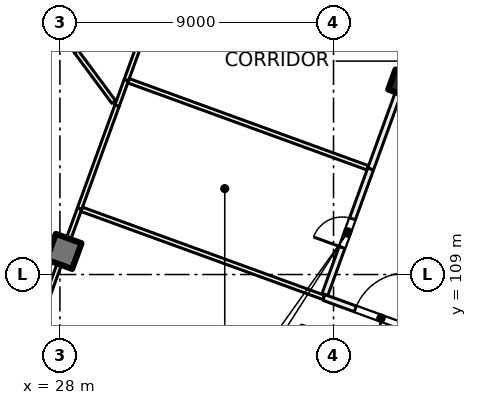
"""IFC4 building model, lengths in metres.
Left out: names, types, materials, properties, quantities, classifications, styles, units other than length and angle.
Written with IfcOpenShell. Run it as: python <this file> out.ifc"""

import sys

from ifc_helpers import new_model, si_unit, direction, frame, frame_2d, origin, origin_2d, place, context, subcontext, project, spatial, rectangle, extrude, element, fill, save


model = new_model("IFC4")
c1 = context("Model", 3, precision=1e-05, world=origin(), true_north=direction((0.0, 1.0)))
c2 = subcontext(c1, "Body", "Model", "MODEL_VIEW")
j1 = project(units=[si_unit("LENGTHUNIT", "METRE"), si_unit("PLANEANGLEUNIT", "RADIAN")], contexts=[c1])
p1 = place(None, origin())
s1 = spatial("IfcSite", under=j1, at=p1, CompositionType="ELEMENT")
p2 = place(p1, origin())
s2 = spatial("IfcBuilding", under=s1, at=p2, CompositionType="ELEMENT")
p3 = place(p2, origin())
s3 = spatial("IfcBuildingStorey", under=s2, at=p3, CompositionType="ELEMENT", Elevation=0.0)
p4 = place(p3, frame((39.247, 115.293, 0.0), z_axis=(0.0, 0.0, 1.0), x_axis=(-0.342020143326, -0.939692620786, 0.0)))
e1 = element("IfcColumn", 1, at=p4, inside=s3, PredefinedType="COLUMN", context=c2, shape_type="SweptSolid", body=[
    extrude(rectangle(XDim=0.7, YDim=0.7, at=origin_2d()), origin(), (0.0, 0.0, 1.0), 7.5),
])
p5 = place(p3, frame((28.134, 109.76, 0.0), z_axis=(0.0, 0.0, 1.0), x_axis=(-0.342020143326, -0.939692620786, 0.0)))
e2 = element("IfcColumn", 2, at=p5, inside=s3, PredefinedType="COLUMN", context=c2, shape_type="SweptSolid", body=[
    extrude(rectangle(XDim=0.9, YDim=0.9, at=origin_2d()), origin(), (0.0, 0.0, 1.0), 7.5),
])
p6 = place(p3, frame((12.199, 89.809, 0.0), z_axis=(0.0, 0.0, 1.0), x_axis=(0.342022998908, 0.939691581434, 0.0)))
e3 = element("IfcWall", 3, at=p6, inside=s3, PredefinedType="SOLIDWALL", context=c2, shape_type="SweptSolid", body=[
    extrude(rectangle(XDim=47.334, YDim=0.6, at=frame_2d((23.667, 0.0))), origin(), (0.0, 0.0, 1.0), 7.1),
])
p7 = place(p6, frame((1.523, 0.0, 0.0)))
e4 = element("IfcOpeningElement", 4, at=p7, cuts=e3, PredefinedType="OPENING", context=c2, shape_type="SweptSolid", body=[
    extrude(rectangle(XDim=1.2, YDim=2.4, at=frame_2d((0.6, 1.2))), frame((0.0, 0.31, 0.0), z_axis=(0.0, -1.0, 0.0), x_axis=(1.0, 0.0, 0.0)), (0.0, 0.0, 1.0), 0.62),
])
p8 = place(p6, frame((5.829, 0.0, 0.0)))
e5 = element("IfcOpeningElement", 5, at=p8, cuts=e3, PredefinedType="OPENING", context=c2, shape_type="SweptSolid", body=[
    extrude(rectangle(XDim=1.2, YDim=2.4, at=frame_2d((0.6, 1.2))), frame((0.0, 0.31, 0.0), z_axis=(0.0, -1.0, 0.0), x_axis=(1.0, 0.0, 0.0)), (0.0, 0.0, 1.0), 0.62),
])
p9 = place(p6, frame((9.235, 0.0, 0.9)))
e6 = element("IfcOpeningElement", 6, at=p9, cuts=e3, PredefinedType="OPENING", context=c2, shape_type="SweptSolid", body=[
    extrude(rectangle(XDim=3.0, YDim=4.2, at=frame_2d((1.5, 2.1))), frame((0.0, 0.31, 0.0), z_axis=(0.0, -1.0, 0.0), x_axis=(1.0, 0.0, 0.0)), (0.0, 0.0, 1.0), 0.62),
])
p10 = place(p6, frame((13.99, 0.0, 0.9)))
e7 = element("IfcOpeningElement", 7, at=p10, cuts=e3, PredefinedType="OPENING", context=c2, shape_type="SweptSolid", body=[
    extrude(rectangle(XDim=3.0, YDim=4.2, at=frame_2d((1.5, 2.1))), frame((0.0, 0.31, 0.0), z_axis=(0.0, -1.0, 0.0), x_axis=(1.0, 0.0, 0.0)), (0.0, 0.0, 1.0), 0.62),
])
p11 = place(p6, frame((17.846, 0.0, 0.9)))
e8 = element("IfcOpeningElement", 8, at=p11, cuts=e3, PredefinedType="OPENING", context=c2, shape_type="SweptSolid", body=[
    extrude(rectangle(XDim=3.0, YDim=4.2, at=frame_2d((1.5, 2.1))), frame((0.0, 0.31, 0.0), z_axis=(0.0, -1.0, 0.0), x_axis=(1.0, 0.0, 0.0)), (0.0, 0.0, 1.0), 0.62),
])
p12 = place(p6, frame((22.452, 0.0, 0.9)))
e9 = element("IfcOpeningElement", 9, at=p12, cuts=e3, PredefinedType="OPENING", context=c2, shape_type="SweptSolid", body=[
    extrude(rectangle(XDim=3.0, YDim=4.2, at=frame_2d((1.5, 2.1))), frame((0.0, 0.31, 0.0), z_axis=(0.0, -1.0, 0.0), x_axis=(1.0, 0.0, 0.0)), (0.0, 0.0, 1.0), 0.62),
])
p13 = place(p6, frame((26.458, 0.0, 0.9)))
e10 = element("IfcOpeningElement", 10, at=p13, cuts=e3, PredefinedType="OPENING", context=c2, shape_type="SweptSolid", body=[
    extrude(rectangle(XDim=3.0, YDim=4.2, at=frame_2d((1.5, 2.1))), frame((0.0, 0.31, 0.0), z_axis=(0.0, -1.0, 0.0), x_axis=(1.0, 0.0, 0.0)), (0.0, 0.0, 1.0), 0.62),
])
p14 = place(p6, frame((31.064, 0.0, 0.9)))
e11 = element("IfcOpeningElement", 11, at=p14, cuts=e3, PredefinedType="OPENING", context=c2, shape_type="SweptSolid", body=[
    extrude(rectangle(XDim=3.0, YDim=4.2, at=frame_2d((1.5, 2.1))), frame((0.0, 0.31, 0.0), z_axis=(0.0, -1.0, 0.0), x_axis=(1.0, 0.0, 0.0)), (0.0, 0.0, 1.0), 0.62),
])
p15 = place(p6, frame((36.029, 0.0, 0.9)))
e12 = element("IfcOpeningElement", 12, at=p15, cuts=e3, PredefinedType="OPENING", context=c2, shape_type="SweptSolid", body=[
    extrude(rectangle(XDim=1.2, YDim=4.2, at=frame_2d((0.6, 2.1))), frame((0.0, 0.31, 0.0), z_axis=(0.0, -1.0, 0.0), x_axis=(1.0, 0.0, 0.0)), (0.0, 0.0, 1.0), 0.62),
])
p16 = place(p6, frame((39.676, 0.0, 0.9)))
e13 = element("IfcOpeningElement", 13, at=p16, cuts=e3, PredefinedType="OPENING", context=c2, shape_type="SweptSolid", body=[
    extrude(rectangle(XDim=3.0, YDim=4.2, at=frame_2d((1.5, 2.1))), frame((0.0, 0.31, 0.0), z_axis=(0.0, -1.0, 0.0), x_axis=(1.0, 0.0, 0.0)), (0.0, 0.0, 1.0), 0.62),
])
p17 = place(p6, frame((43.531, 0.0, 0.9)))
e14 = element("IfcOpeningElement", 14, at=p17, cuts=e3, PredefinedType="OPENING", context=c2, shape_type="SweptSolid", body=[
    extrude(rectangle(XDim=3.0, YDim=4.2, at=frame_2d((1.5, 2.1))), frame((0.0, 0.31, 0.0), z_axis=(0.0, -1.0, 0.0), x_axis=(1.0, 0.0, 0.0)), (0.0, 0.0, 1.0), 0.62),
])
p18 = place(p3, frame((24.8, 100.598, 0.0), z_axis=(0.0, 0.0, 1.0), x_axis=(0.341943433621, 0.93972053729, 0.0)))
e15 = element("IfcWall", 15, at=p18, inside=s3, PredefinedType="PARTITIONING", context=c2, shape_type="SweptSolid", body=[
    extrude(rectangle(XDim=11.25, YDim=0.15, at=frame_2d((5.625, 0.0))), origin(), (0.0, 0.0, 1.0), 7.1),
])
p19 = place(p3, frame((27.478, 118.104, 0.0), z_axis=(0.0, 0.0, 1.0), x_axis=(0.514009565734, -0.857784452141, 0.0)))
e16 = element("IfcWall", 16, at=p19, inside=s3, PredefinedType="PARTITIONING", context=c2, shape_type="SweptSolid", body=[
    extrude(rectangle(XDim=2.068, YDim=0.15, at=frame_2d((1.034, 0.0))), origin(), (0.0, 0.0, 1.0), 7.1),
])
p20 = place(p3, frame((28.537, 116.336, 0.0), z_axis=(0.0, 0.0, 1.0), x_axis=(0.595741297031, -0.80317638599, 0.0)))
e17 = element("IfcWall", 17, at=p20, inside=s3, PredefinedType="PARTITIONING", context=c2, shape_type="SweptSolid", body=[
    extrude(rectangle(XDim=2.068, YDim=0.15, at=frame_2d((1.034, 0.0))), origin(), (0.0, 0.0, 1.0), 7.1),
])
p21 = place(p3, frame((28.647, 111.17, 0.0), z_axis=(0.0, 0.0, 1.0), x_axis=(0.341993373756, 0.939702363681, 0.0)))
e18 = element("IfcWall", 18, at=p21, inside=s3, PredefinedType="PARTITIONING", context=c2, shape_type="SweptSolid", body=[
    extrude(rectangle(XDim=3.602, YDim=0.15, at=frame_2d((1.801, 0.0))), origin(), (0.0, 0.0, 1.0), 7.1),
])
p22 = place(p3, frame((28.717, 111.144, 0.0), z_axis=(0.0, 0.0, 1.0), x_axis=(0.939731172492, -0.341914204803, 0.0)))
e19 = element("IfcWall", 19, at=p22, inside=s3, PredefinedType="PARTITIONING", context=c2, shape_type="SweptSolid", body=[
    extrude(rectangle(XDim=8.476, YDim=0.15, at=frame_2d((4.238, 0.0))), origin(), (0.0, 0.0, 1.0), 7.1),
])
p23 = place(p3, frame((29.879, 114.555, 0.0), z_axis=(0.0, 0.0, 1.0), x_axis=(0.341961311006, 0.939714031914, 0.0)))
e20 = element("IfcWall", 20, at=p23, inside=s3, PredefinedType="PARTITIONING", context=c2, shape_type="SweptSolid", body=[
    extrude(rectangle(XDim=0.898, YDim=0.15, at=frame_2d((0.449, 0.0))), origin(), (0.0, 0.0, 1.0), 7.1),
])
p24 = place(p3, frame((30.186, 115.399, 0.0), z_axis=(0.0, 0.0, 1.0), x_axis=(0.342121388632, 0.939655764331, 0.0)))
e21 = element("IfcWall", 21, at=p24, inside=s3, PredefinedType="PARTITIONING", context=c2, shape_type="SweptSolid", body=[
    extrude(rectangle(XDim=13.574, YDim=0.15, at=frame_2d((6.787, 0.0))), origin(), (0.0, 0.0, 1.0), 7.1),
])
p25 = place(p3, frame((30.256, 115.373, 0.0), z_axis=(0.0, 0.0, 1.0), x_axis=(0.939683593483, -0.342044944618, 0.0)))
e22 = element("IfcWall", 22, at=p25, inside=s3, PredefinedType="PARTITIONING", context=c2, shape_type="SweptSolid", body=[
    extrude(rectangle(XDim=8.376, YDim=0.15, at=frame_2d((4.188, 0.0))), origin(), (0.0, 0.0, 1.0), 7.1),
])
p26 = place(p3, frame((36.716, 108.34, 0.0), z_axis=(0.0, 0.0, 1.0), x_axis=(0.342063854115, 0.939676710208, 0.0)))
e23 = element("IfcWall", 23, at=p26, inside=s3, PredefinedType="PARTITIONING", context=c2, shape_type="SweptSolid", body=[
    extrude(rectangle(XDim=4.399, YDim=0.2, at=frame_2d((2.2, 0.0))), origin(), (0.0, 0.0, 1.0), 7.1),
])
p27 = place(p26, frame((1.652, 0.0, 0.0)))
e24 = element("IfcOpeningElement", 24, at=p27, cuts=e23, PredefinedType="OPENING", context=c2, shape_type="SweptSolid", body=[
    extrude(rectangle(XDim=1.0, YDim=2.1, at=frame_2d((0.5, 1.05))), frame((0.0, 0.11, 0.0), z_axis=(0.0, -1.0, 0.0), x_axis=(1.0, 0.0, 0.0)), (0.0, 0.0, 1.0), 0.22),
])
p28 = place(p3, frame((40.44, 106.878, 0.0), z_axis=(0.0, 0.0, 1.0), x_axis=(-0.939665029144, 0.342095941228, 0.0)))
e25 = element("IfcWall", 25, at=p28, inside=s3, PredefinedType="PARTITIONING", context=c2, shape_type="SweptSolid", body=[
    extrude(rectangle(XDim=3.999, YDim=0.2, at=frame_2d((2.0, 0.0))), origin(), (0.0, 0.0, 1.0), 7.1),
])
p29 = place(p28, frame((1.099, 0.0, 0.0)))
e26 = element("IfcOpeningElement", 26, at=p29, cuts=e25, PredefinedType="OPENING", context=c2, shape_type="SweptSolid", body=[
    extrude(rectangle(XDim=1.8, YDim=2.1, at=frame_2d((0.9, 1.05))), frame((0.0, 0.11, 0.0), z_axis=(0.0, -1.0, 0.0), x_axis=(1.0, 0.0, 0.0)), (0.0, 0.0, 1.0), 0.22),
])
p30 = place(p3, frame((38.221, 112.474, 0.0), z_axis=(0.0, 0.0, 1.0), x_axis=(0.342018071111, 0.939693375008, 0.0)))
e27 = element("IfcWall", 27, at=p30, inside=s3, PredefinedType="PARTITIONING", context=c2, shape_type="SweptSolid", body=[
    extrude(rectangle(XDim=13.4, YDim=0.2, at=frame_2d((6.7, 0.0))), origin(), (0.0, 0.0, 1.0), 7.1),
])
p31 = place(p30, frame((6.248, 0.0, 0.0)))
e28 = element("IfcOpeningElement", 28, at=p31, cuts=e27, PredefinedType="OPENING", context=c2, shape_type="SweptSolid", body=[
    extrude(rectangle(XDim=1.0, YDim=2.1, at=frame_2d((0.5, 1.05))), frame((0.0, 0.11, 0.0), z_axis=(0.0, -1.0, 0.0), x_axis=(1.0, 0.0, 0.0)), (0.0, 0.0, 1.0), 0.22),
])
p32 = place(p27, origin())
e29 = element("IfcDoor", 29, at=p32, inside=s3, OperationType="SINGLE_SWING_LEFT", PredefinedType="DOOR", context=c2, shape_type="SweptSolid", body=[
    extrude(rectangle(XDim=1.0, YDim=2.1, at=frame_2d((0.5, 1.05))), frame((0.0, 0.025, 0.0), z_axis=(0.0, -1.0, 0.0), x_axis=(1.0, 0.0, 0.0)), (0.0, 0.0, 1.0), 0.05),
])
fill(e24, e29)
p33 = place(p29, origin())
e30 = element("IfcDoor", 30, at=p33, inside=s3, OperationType="DOUBLE_DOOR_SINGLE_SWING", PredefinedType="DOOR", context=c2, shape_type="SweptSolid", body=[
    extrude(rectangle(XDim=1.8, YDim=2.1, at=frame_2d((0.9, 1.05))), frame((0.0, 0.025, 0.0), z_axis=(0.0, -1.0, 0.0), x_axis=(1.0, 0.0, 0.0)), (0.0, 0.0, 1.0), 0.05),
])
fill(e26, e30)
save(model, sys.argv[1])
